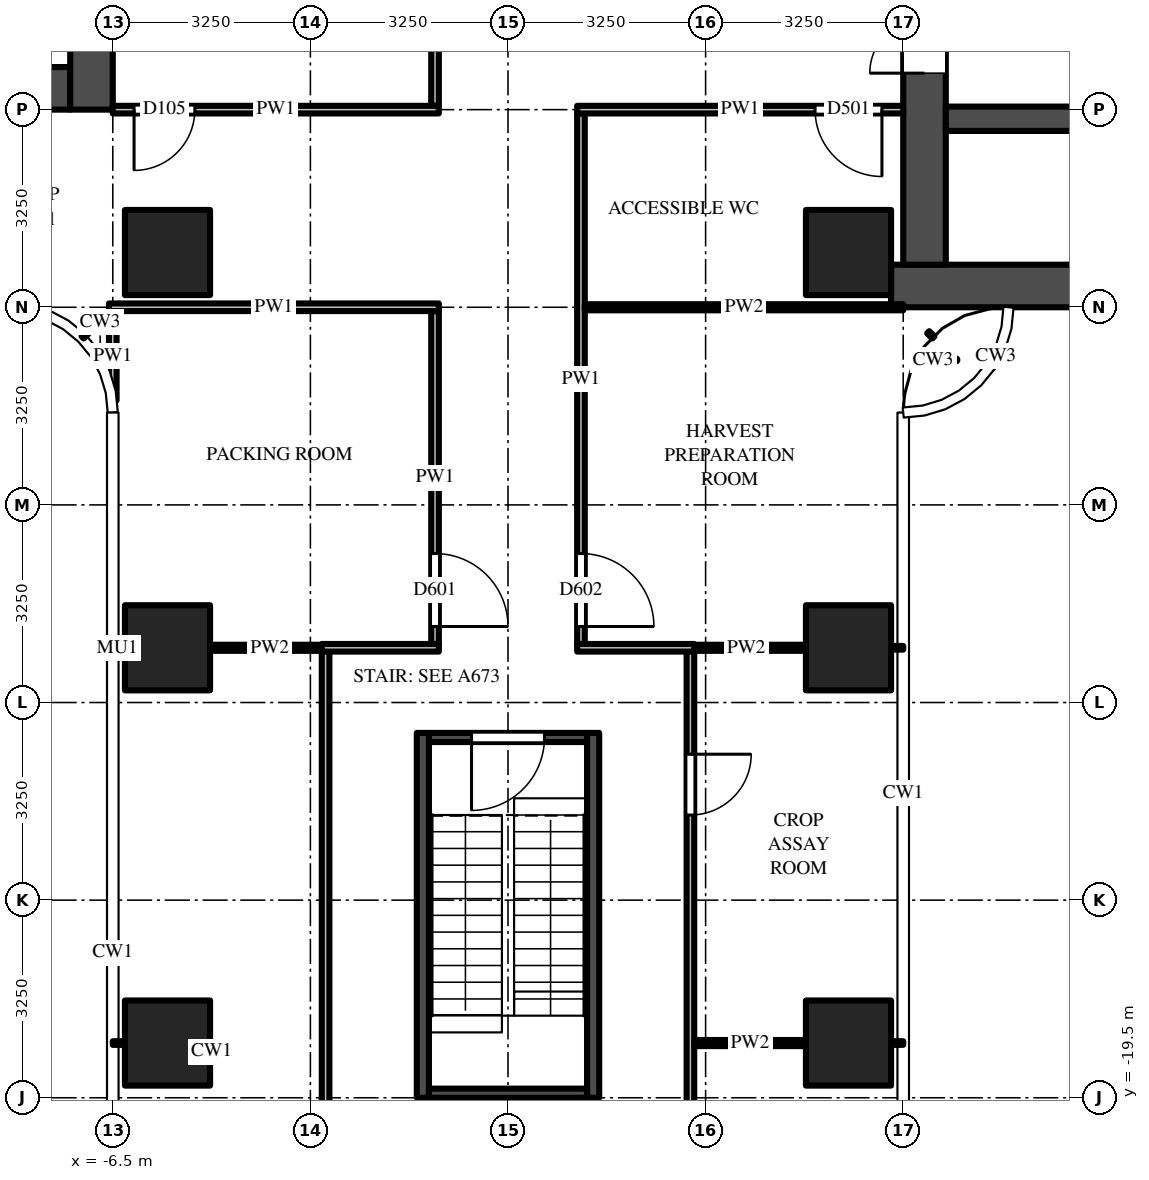
"""IFC4 building model, lengths in metres.
Left out: names, types, materials, properties, quantities, classifications, styles, units other than length and angle.
Written with IfcOpenShell. Run it as: python <this file> out.ifc"""

import sys

from ifc_helpers import new_model, si_unit, direction, frame, frame_2d, origin, origin_2d, place, context, subcontext, project, spatial, rectangle, extrude, source, transform, mapped, element, fill, save


model = new_model("IFC4")
c1 = context("Model", 3, precision=1e-05, world=origin(), true_north=direction((0.0, 1.0)))
c2 = subcontext(c1, "Body", "Model", "MODEL_VIEW")
j1 = project(units=[si_unit("LENGTHUNIT", "METRE"), si_unit("PLANEANGLEUNIT", "RADIAN")], contexts=[c1])
p1 = place(None, origin())
s1 = spatial("IfcSite", under=j1, at=p1, CompositionType="ELEMENT")
p2 = place(p1, origin())
s2 = spatial("IfcBuilding", under=s1, at=p2, CompositionType="ELEMENT")
p3 = place(p2, frame((0.0, 0.0, 70.0)))
s3 = spatial("IfcBuildingStorey", under=s2, at=p3, CompositionType="ELEMENT", Elevation=70.0)
m1 = source(origin(), c2, "Body", "SweptSolid", [
    extrude(rectangle(XDim=1.4, YDim=1.4, at=origin_2d()), origin(), (0.0, 0.0, 1.0), 4.5),
])
for number, where, z_axis, x_axis in (
    (1, (5.6, -5.6, 0.0), (0.0, 0.0, 1.0), (1.0, 0.0, 0.0)),
    (2, (-5.6, -5.6, 0.0), (0.0, 0.0, 1.0), (1.0, 0.0, 0.0)),
    (3, (5.6, -12.1, 0.0), (0.0, 0.0, 1.0), (1.0, 0.0, 0.0)),
    (4, (5.6, -18.6, 0.0), (0.0, 0.0, 1.0), (1.0, 0.0, 0.0)),
    (5, (-5.6, -12.1, 0.0), (0.0, 0.0, 1.0), (1.0, 0.0, 0.0)),
    (6, (-5.6, -18.6, 0.0), (0.0, 0.0, 1.0), (1.0, 0.0, 0.0)),
):
    element("IfcColumn", number, at=place(p3, frame(where, z_axis=z_axis, x_axis=x_axis)), inside=s3, PredefinedType="COLUMN", context=c2, shape_type="MappedRepresentation", body=[
        mapped(m1, transform((0.0, 0.0, 0.0))),
    ])
m2 = source(origin(), c2, "Body", "SweptSolid", [
    extrude(rectangle(XDim=16.45, YDim=0.7, at=frame_2d((8.225, 0.0))), origin(), (0.0, 0.0, 1.0), 4.25),
])
p4 = place(p3, frame((6.3, -6.15, 0.0), z_axis=(0.0, 0.0, 1.0), x_axis=(1.0, 0.0, 0.0)))
e7 = element("IfcWall", 7, at=p4, inside=s3, PredefinedType="SHEAR", context=c2, shape_type="MappedRepresentation", body=[
    mapped(m2, transform((0.0, 0.0, 0.0))),
])
m3 = source(origin(), c2, "Body", "SweptSolid", [
    extrude(rectangle(XDim=9.05, YDim=0.7, at=frame_2d((4.525, 0.0))), origin(), (0.0, 0.0, 1.0), 4.25),
])
p5 = place(p3, frame((6.85, -5.8, 0.0), z_axis=(0.0, 0.0, 1.0), x_axis=(0.0, 1.0, 0.0)))
e8 = element("IfcWall", 8, at=p5, inside=s3, PredefinedType="SHEAR", context=c2, shape_type="MappedRepresentation", body=[
    mapped(m3, transform((0.0, 0.0, 0.0))),
])
m4 = source(origin(), c2, "Body", "SweptSolid", [
    extrude(rectangle(XDim=1.8, YDim=2.1, at=frame_2d((0.9, 1.05))), frame((0.0, 0.36, 0.0), z_axis=(0.0, -1.0, 0.0), x_axis=(1.0, 0.0, 0.0)), (0.0, 0.0, 1.0), 0.72),
])
p6 = place(p5, frame((3.15, 0.0, 0.0)))
e9 = element("IfcOpeningElement", 9, at=p6, cuts=e8, PredefinedType="OPENING", context=c2, shape_type="MappedRepresentation", body=[
    mapped(m4, transform((0.0, 0.0, 0.0))),
])
m5 = source(origin(), c2, "Body", "SweptSolid", [
    extrude(rectangle(XDim=7.5, YDim=0.4, at=frame_2d((3.75, 0.0))), origin(), (0.0, 0.0, 1.0), 4.25),
])
p7 = place(p3, frame((7.2, -3.4, 0.0), z_axis=(0.0, 0.0, 1.0), x_axis=(1.0, 0.0, 0.0)))
e10 = element("IfcWall", 10, at=p7, inside=s3, PredefinedType="SHEAR", context=c2, shape_type="MappedRepresentation", body=[
    mapped(m5, transform((0.0, 0.0, 0.0))),
])
m6 = source(origin(), c2, "Body", "SweptSolid", [
    extrude(rectangle(XDim=1.1, YDim=2.1, at=frame_2d((0.55, 1.05))), frame((0.0, 0.21, 0.0), z_axis=(0.0, -1.0, 0.0), x_axis=(1.0, 0.0, 0.0)), (0.0, 0.0, 1.0), 0.42),
])
p8 = place(p7, frame((3.0, 0.0, 0.0)))
e11 = element("IfcOpeningElement", 11, at=p8, cuts=e10, PredefinedType="OPENING", context=c2, shape_type="MappedRepresentation", body=[
    mapped(m6, transform((0.0, 0.0, 0.0))),
])
p9 = place(p7, frame((5.5, 0.0, 0.0)))
e12 = element("IfcOpeningElement", 12, at=p9, cuts=e10, PredefinedType="OPENING", context=c2, shape_type="MappedRepresentation", body=[
    mapped(m6, transform((0.0, 0.0, 0.0))),
])
m7 = source(origin(), c2, "Body", "SweptSolid", [
    extrude(rectangle(XDim=14.85, YDim=0.7, at=frame_2d((7.425, 0.0))), origin(), (0.0, 0.0, 1.0), 4.25),
])
p10 = place(p3, frame((-7.2, -2.9, 0.0), z_axis=(0.0, 0.0, 1.0), x_axis=(-1.0, 0.0, 0.0)))
e13 = element("IfcWall", 13, at=p10, inside=s3, PredefinedType="SHEAR", context=c2, shape_type="MappedRepresentation", body=[
    mapped(m7, transform((0.0, 0.0, 0.0))),
])
m8 = source(origin(), c2, "Body", "SweptSolid", [
    extrude(rectangle(XDim=1.3, YDim=2.1, at=frame_2d((0.65, 1.05))), frame((0.0, 0.36, 0.0), z_axis=(0.0, -1.0, 0.0), x_axis=(1.0, 0.0, 0.0)), (0.0, 0.0, 1.0), 0.72),
])
p11 = place(p10, frame((12.2, 0.0, 0.0)))
e14 = element("IfcOpeningElement", 14, at=p11, cuts=e13, PredefinedType="OPENING", context=c2, shape_type="MappedRepresentation", body=[
    mapped(m8, transform((0.0, 0.0, 0.0))),
])
m9 = source(origin(), c2, "Body", "SweptSolid", [
    extrude(rectangle(XDim=1.2, YDim=2.1, at=frame_2d((0.6, 1.05))), frame((0.0, 0.36, 0.0), z_axis=(0.0, -1.0, 0.0), x_axis=(1.0, 0.0, 0.0)), (0.0, 0.0, 1.0), 0.72),
])
p12 = place(p10, frame((9.85, 0.0, 0.0)))
e15 = element("IfcOpeningElement", 15, at=p12, cuts=e13, PredefinedType="OPENING", context=c2, shape_type="MappedRepresentation", body=[
    mapped(m9, transform((0.0, 0.0, 0.0))),
])
m10 = source(origin(), c2, "Body", "SweptSolid", [
    extrude(rectangle(XDim=1.0, YDim=2.1, at=frame_2d((0.5, 1.05))), frame((0.0, 0.36, 0.0), z_axis=(0.0, -1.0, 0.0), x_axis=(1.0, 0.0, 0.0)), (0.0, 0.0, 1.0), 0.72),
])
p13 = place(p10, frame((7.9, 0.0, 0.0)))
e16 = element("IfcOpeningElement", 16, at=p13, cuts=e13, PredefinedType="OPENING", context=c2, shape_type="MappedRepresentation", body=[
    mapped(m10, transform((0.0, 0.0, 0.0))),
])
m11 = source(origin(), c2, "Body", "SweptSolid", [
    extrude(rectangle(XDim=0.9, YDim=2.1, at=frame_2d((0.45, 1.05))), frame((0.0, 0.36, 0.0), z_axis=(0.0, -1.0, 0.0), x_axis=(1.0, 0.0, 0.0)), (0.0, 0.0, 1.0), 0.72),
])
p14 = place(p10, frame((0.65, 0.0, 0.0)))
e17 = element("IfcOpeningElement", 17, at=p14, cuts=e13, PredefinedType="OPENING", context=c2, shape_type="MappedRepresentation", body=[
    mapped(m11, transform((0.0, 0.0, 0.0))),
])
p15 = place(p10, frame((3.2, 0.0, 0.0)))
e18 = element("IfcOpeningElement", 18, at=p15, cuts=e13, PredefinedType="OPENING", context=c2, shape_type="MappedRepresentation", body=[
    mapped(m10, transform((0.0, 0.0, 0.0))),
])
p16 = place(p10, frame((5.85, 0.0, 0.0)))
e19 = element("IfcOpeningElement", 19, at=p16, cuts=e13, PredefinedType="OPENING", context=c2, shape_type="MappedRepresentation", body=[
    mapped(m11, transform((0.0, 0.0, 0.0))),
])
p17 = place(p3, frame((-6.85, 5.8, 0.0), z_axis=(0.0, 0.0, 1.0), x_axis=(0.0, -1.0, 0.0)))
e20 = element("IfcWall", 20, at=p17, inside=s3, PredefinedType="SHEAR", context=c2, shape_type="MappedRepresentation", body=[
    mapped(m3, transform((0.0, 0.0, 0.0))),
])
p18 = place(p17, frame((3.15, 0.0, 0.0)))
e21 = element("IfcOpeningElement", 21, at=p18, cuts=e20, PredefinedType="OPENING", context=c2, shape_type="MappedRepresentation", body=[
    mapped(m4, transform((0.0, 0.0, 0.0))),
])
m12 = source(origin(), c2, "Body", "SweptSolid", [
    extrude(rectangle(XDim=6.0, YDim=0.2, at=frame_2d((3.0, 0.0))), origin(), (0.0, 0.0, 1.0), 4.25),
])
for number, where, z_axis, x_axis in (
    (22, (1.4, -13.5, 0.0), (0.0, 0.0, 1.0), (0.0, -1.0, 0.0)),
    (23, (-1.4, -13.5, 0.0), (0.0, 0.0, 1.0), (0.0, -1.0, 0.0)),
):
    element("IfcWall", number, at=place(p3, frame(where, z_axis=z_axis, x_axis=x_axis)), inside=s3, PredefinedType="SHEAR", context=c2, shape_type="MappedRepresentation", body=[
        mapped(m12, transform((0.0, 0.0, 0.0))),
    ])
m13 = source(origin(), c2, "Body", "SweptSolid", [
    extrude(rectangle(XDim=2.6, YDim=0.15, at=frame_2d((1.3, 0.0))), origin(), (0.0, 0.0, 1.0), 4.25),
])
p19 = place(p3, frame((1.3, -13.575, 0.0), z_axis=(0.0, 0.0, 1.0), x_axis=(-1.0, 0.0, 0.0)))
e24 = element("IfcWall", 24, at=p19, inside=s3, PredefinedType="SHEAR", context=c2, shape_type="MappedRepresentation", body=[
    mapped(m13, transform((0.0, 0.0, 0.0))),
])
m14 = source(origin(), c2, "Body", "SweptSolid", [
    extrude(rectangle(XDim=1.2, YDim=2.1, at=frame_2d((0.6, 1.05))), frame((0.0, 0.085, 0.0), z_axis=(0.0, -1.0, 0.0), x_axis=(1.0, 0.0, 0.0)), (0.0, 0.0, 1.0), 0.17),
])
p20 = place(p19, frame((0.7, 0.0, 0.0)))
e25 = element("IfcOpeningElement", 25, at=p20, cuts=e24, PredefinedType="OPENING", context=c2, shape_type="MappedRepresentation", body=[
    mapped(m14, transform((0.0, 0.0, 0.0))),
])
p21 = place(p3, frame((1.3, -19.425, 0.0), z_axis=(0.0, 0.0, 1.0), x_axis=(-1.0, 0.0, 0.0)))
e26 = element("IfcWall", 26, at=p21, inside=s3, PredefinedType="SHEAR", context=c2, shape_type="MappedRepresentation", body=[
    mapped(m13, transform((0.0, 0.0, 0.0))),
])
m15 = source(origin(), c2, "Body", "SweptSolid", [
    extrude(rectangle(XDim=1.469, YDim=0.125, at=frame_2d((0.734, 0.0))), origin(), (0.0, 0.0, 1.0), 4.25),
])
p22 = place(p3, frame((-6.5, -6.562, 0.0), z_axis=(0.0, 0.0, 1.0), x_axis=(0.0, -1.0, 0.0)))
e27 = element("IfcWall", 27, at=p22, inside=s3, PredefinedType="PARTITIONING", context=c2, shape_type="MappedRepresentation", body=[
    mapped(m15, transform((0.0, 0.0, 0.0))),
])
m16 = source(origin(), c2, "Body", "SweptSolid", [
    extrude(rectangle(XDim=8.788, YDim=0.125, at=frame_2d((4.394, 0.0))), origin(), (0.0, 0.0, 1.0), 3.468),
])
p23 = place(p3, frame((-3.0, -20.938, 0.0), z_axis=(0.0, 0.0, 1.0), x_axis=(0.0, 1.0, 0.0)))
e28 = element("IfcWall", 28, at=p23, inside=s3, PredefinedType="PARTITIONING", context=c2, shape_type="MappedRepresentation", body=[
    mapped(m16, transform((0.0, 0.0, 0.0))),
])
m17 = source(origin(), c2, "Body", "SweptSolid", [
    extrude(rectangle(XDim=5.475, YDim=0.125, at=frame_2d((2.738, 0.0))), origin(), (0.0, 0.0, 1.0), 3.468),
])
p24 = place(p3, frame((-1.2, -6.562, 0.0), z_axis=(0.0, 0.0, 1.0), x_axis=(0.0, -1.0, 0.0)))
e29 = element("IfcWall", 29, at=p24, inside=s3, PredefinedType="PARTITIONING", context=c2, shape_type="MappedRepresentation", body=[
    mapped(m17, transform((0.0, 0.0, 0.0))),
])
m18 = source(origin(), c2, "Body", "SweptSolid", [
    extrude(rectangle(XDim=1.2, YDim=2.1, at=frame_2d((0.6, 1.05))), frame((0.0, 0.073, 0.0), z_axis=(0.0, -1.0, 0.0), x_axis=(1.0, 0.0, 0.0)), (0.0, 0.0, 1.0), 0.145),
])
p25 = place(p24, frame((3.988, 0.0, 0.0)))
e30 = element("IfcOpeningElement", 30, at=p25, cuts=e29, PredefinedType="OPENING", context=c2, shape_type="MappedRepresentation", body=[
    mapped(m18, transform((0.0, 0.0, 0.0))),
])
m19 = source(origin(), c2, "Body", "SweptSolid", [
    extrude(rectangle(XDim=3.125, YDim=0.125, at=frame_2d((1.562, 0.0))), origin(), (0.0, 0.0, 1.0), 3.546),
])
p26 = place(p3, frame((-1.2, -0.062, 0.0), z_axis=(0.0, 0.0, 1.0), x_axis=(0.0, -1.0, 0.0)))
e31 = element("IfcWall", 31, at=p26, inside=s3, PredefinedType="PARTITIONING", context=c2, shape_type="MappedRepresentation", body=[
    mapped(m19, transform((0.0, 0.0, 0.0))),
])
m20 = source(origin(), c2, "Body", "SweptSolid", [
    extrude(rectangle(XDim=8.725, YDim=0.125, at=frame_2d((4.363, 0.0))), origin(), (0.0, 0.0, 1.0), 3.468),
])
p27 = place(p3, frame((1.2, -3.312, 0.0), z_axis=(0.0, 0.0, 1.0), x_axis=(0.0, -1.0, 0.0)))
e32 = element("IfcWall", 32, at=p27, inside=s3, PredefinedType="PARTITIONING", context=c2, shape_type="MappedRepresentation", body=[
    mapped(m20, transform((0.0, 0.0, 0.0))),
])
p28 = place(p27, frame((7.238, 0.0, 0.0)))
e33 = element("IfcOpeningElement", 33, at=p28, cuts=e32, PredefinedType="OPENING", context=c2, shape_type="MappedRepresentation", body=[
    mapped(m18, transform((0.0, 0.0, 0.0))),
])
p29 = place(p3, frame((3.0, -12.15, 0.0), z_axis=(0.0, 0.0, 1.0), x_axis=(0.0, -1.0, 0.0)))
e34 = element("IfcWall", 34, at=p29, inside=s3, PredefinedType="PARTITIONING", context=c2, shape_type="MappedRepresentation", body=[
    mapped(m16, transform((0.0, 0.0, 0.0))),
])
m21 = source(origin(), c2, "Body", "SweptSolid", [
    extrude(rectangle(XDim=1.0, YDim=2.1, at=frame_2d((0.5, 1.05))), frame((0.0, 0.073, 0.0), z_axis=(0.0, -1.0, 0.0), x_axis=(1.0, 0.0, 0.0)), (0.0, 0.0, 1.0), 0.145),
])
p30 = place(p29, frame((1.7, 0.0, 0.0)))
e35 = element("IfcOpeningElement", 35, at=p30, cuts=e34, PredefinedType="OPENING", context=c2, shape_type="MappedRepresentation", body=[
    mapped(m21, transform((0.0, 0.0, 0.0))),
])
m22 = source(origin(), c2, "Body", "SweptSolid", [
    extrude(rectangle(XDim=1.837, YDim=0.1, at=frame_2d((0.919, 0.0))), origin(), (0.0, 0.0, 1.0), 3.697),
])
p31 = place(p3, frame((3.062, -18.6, 0.0), z_axis=(0.0, 0.0, 1.0), x_axis=(1.0, 0.0, 0.0)))
e36 = element("IfcWall", 36, at=p31, inside=s3, PredefinedType="PARTITIONING", context=c2, shape_type="MappedRepresentation", body=[
    mapped(m22, transform((0.0, 0.0, 0.0))),
])
m23 = source(origin(), c2, "Body", "SweptSolid", [
    extrude(rectangle(XDim=1.962, YDim=0.1, at=frame_2d((0.981, 0.0))), origin(), (0.0, 0.0, 1.0), 3.468),
])
for number, where, z_axis, x_axis in (
    (37, (-4.9, -12.1, 0.0), (0.0, 0.0, 1.0), (1.0, 0.0, 0.0)),
    (38, (2.938, -12.1, 0.0), (0.0, 0.0, 1.0), (1.0, 0.0, 0.0)),
):
    element("IfcWall", number, at=place(p3, frame(where, z_axis=z_axis, x_axis=x_axis)), inside=s3, PredefinedType="PARTITIONING", context=c2, shape_type="MappedRepresentation", body=[
        mapped(m23, transform((0.0, 0.0, 0.0))),
    ])
m24 = source(origin(), c2, "Body", "SweptSolid", [
    extrude(rectangle(XDim=1.925, YDim=0.125, at=frame_2d((0.962, 0.0))), origin(), (0.0, 0.0, 1.0), 3.468),
])
for number, where, z_axis, x_axis in (
    (39, (-3.062, -12.1, 0.0), (0.0, 0.0, 1.0), (1.0, 0.0, 0.0)),
    (40, (1.137, -12.1, 0.0), (0.0, 0.0, 1.0), (1.0, 0.0, 0.0)),
):
    element("IfcWall", number, at=place(p3, frame(where, z_axis=z_axis, x_axis=x_axis)), inside=s3, PredefinedType="PARTITIONING", context=c2, shape_type="MappedRepresentation", body=[
        mapped(m24, transform((0.0, 0.0, 0.0))),
    ])
m25 = source(origin(), c2, "Body", "SweptSolid", [
    extrude(rectangle(XDim=5.238, YDim=0.1, at=frame_2d((2.619, 0.0))), origin(), (0.0, 0.0, 1.0), 3.33),
])
p32 = place(p3, frame((1.262, -6.5, 0.0), z_axis=(0.0, 0.0, 1.0), x_axis=(1.0, 0.0, 0.0)))
e41 = element("IfcWall", 41, at=p32, inside=s3, PredefinedType="PARTITIONING", context=c2, shape_type="MappedRepresentation", body=[
    mapped(m25, transform((0.0, 0.0, 0.0))),
])
m26 = source(origin(), c2, "Body", "SweptSolid", [
    extrude(rectangle(XDim=5.425, YDim=0.125, at=frame_2d((2.712, 0.0))), origin(), (0.0, 0.0, 1.0), 3.33),
])
p33 = place(p3, frame((-1.137, -6.5, 0.0), z_axis=(0.0, 0.0, 1.0), x_axis=(-1.0, 0.0, 0.0)))
e42 = element("IfcWall", 42, at=p33, inside=s3, PredefinedType="PARTITIONING", context=c2, shape_type="MappedRepresentation", body=[
    mapped(m26, transform((0.0, 0.0, 0.0))),
])
m27 = source(origin(), c2, "Body", "SweptSolid", [
    extrude(rectangle(XDim=5.363, YDim=0.125, at=frame_2d((2.681, 0.0))), origin(), (0.0, 0.0, 1.0), 3.468),
])
p34 = place(p3, frame((-1.137, -3.25, 0.0), z_axis=(0.0, 0.0, 1.0), x_axis=(-1.0, 0.0, 0.0)))
e43 = element("IfcWall", 43, at=p34, inside=s3, PredefinedType="PARTITIONING", context=c2, shape_type="MappedRepresentation", body=[
    mapped(m27, transform((0.0, 0.0, 0.0))),
])
p35 = place(p34, frame((4.012, 0.0, 0.0)))
e44 = element("IfcOpeningElement", 44, at=p35, cuts=e43, PredefinedType="OPENING", context=c2, shape_type="MappedRepresentation", body=[
    mapped(m21, transform((0.0, 0.0, 0.0))),
])
p36 = place(p3, frame((6.5, -3.25, 0.0), z_axis=(0.0, 0.0, 1.0), x_axis=(-1.0, 0.0, 0.0)))
e45 = element("IfcWall", 45, at=p36, inside=s3, PredefinedType="PARTITIONING", context=c2, shape_type="MappedRepresentation", body=[
    mapped(m27, transform((0.0, 0.0, 0.0))),
])
m28 = source(origin(), c2, "Body", "SweptSolid", [
    extrude(rectangle(XDim=1.1, YDim=2.1, at=frame_2d((0.55, 1.05))), frame((0.0, 0.073, 0.0), z_axis=(0.0, -1.0, 0.0), x_axis=(1.0, 0.0, 0.0)), (0.0, 0.0, 1.0), 0.145),
])
p37 = place(p36, frame((0.35, 0.0, 0.0)))
e46 = element("IfcOpeningElement", 46, at=p37, cuts=e45, PredefinedType="OPENING", context=c2, shape_type="MappedRepresentation", body=[
    mapped(m28, transform((0.0, 0.0, 0.0))),
])
m29 = source(origin(), c2, "Body", "SweptSolid", [
    extrude(rectangle(XDim=1.8, YDim=2.1, at=frame_2d((0.9, 1.05))), frame((0.0, -0.275, 0.0), z_axis=(0.0, -1.0, 0.0), x_axis=(1.0, 0.0, 0.0)), (0.0, 0.0, 1.0), 0.05),
])
p38 = place(p6, origin())
e47 = element("IfcDoor", 47, at=p38, inside=s3, OperationType="DOUBLE_DOOR_SINGLE_SWING", PredefinedType="DOOR", context=c2, shape_type="MappedRepresentation", body=[
    mapped(m29, transform((0.0, 0.0, 0.0))),
])
fill(e9, e47)
m30 = source(origin(), c2, "Body", "SweptSolid", [
    extrude(rectangle(XDim=1.2, YDim=2.1, at=frame_2d((0.6, 1.05))), frame((0.0, 0.025, 0.0), z_axis=(0.0, -1.0, 0.0), x_axis=(1.0, 0.0, 0.0)), (0.0, 0.0, 1.0), 0.05),
])
p39 = place(p20, origin())
e48 = element("IfcDoor", 48, at=p39, inside=s3, OperationType="SINGLE_SWING_RIGHT", PredefinedType="DOOR", context=c2, shape_type="MappedRepresentation", body=[
    mapped(m30, transform((0.0, 0.0, 0.0))),
])
fill(e25, e48)
m31 = source(origin(), c2, "Body", "SweptSolid", [
    extrude(rectangle(XDim=1.0, YDim=2.1, at=frame_2d((0.5, 1.05))), frame((0.0, 0.025, 0.0), z_axis=(0.0, -1.0, 0.0), x_axis=(1.0, 0.0, 0.0)), (0.0, 0.0, 1.0), 0.05),
])
p40 = place(p30, origin())
e49 = element("IfcDoor", 49, at=p40, inside=s3, OperationType="SINGLE_SWING_LEFT", PredefinedType="DOOR", context=c2, shape_type="MappedRepresentation", body=[
    mapped(m31, transform((0.0, 0.0, 0.0))),
])
fill(e35, e49)
p41 = place(p25, origin())
e50 = element("IfcDoor", 50, at=p41, inside=s3, OperationType="SINGLE_SWING_RIGHT", PredefinedType="DOOR", context=c2, shape_type="MappedRepresentation", body=[
    mapped(m30, transform((0.0, 0.0, 0.0))),
])
fill(e30, e50)
p42 = place(p28, origin())
e51 = element("IfcDoor", 51, at=p42, inside=s3, OperationType="SINGLE_SWING_RIGHT", PredefinedType="DOOR", context=c2, shape_type="MappedRepresentation", body=[
    mapped(m30, transform((0.0, 0.0, 0.0))),
])
fill(e33, e51)
p43 = place(p35, origin())
e52 = element("IfcDoor", 52, at=p43, inside=s3, OperationType="SINGLE_SWING_RIGHT", PredefinedType="DOOR", context=c2, shape_type="MappedRepresentation", body=[
    mapped(m31, transform((0.0, 0.0, 0.0))),
])
fill(e44, e52)
m32 = source(origin(), c2, "Body", "SweptSolid", [
    extrude(rectangle(XDim=1.1, YDim=2.1, at=frame_2d((0.55, 1.05))), frame((0.0, 0.025, 0.0), z_axis=(0.0, -1.0, 0.0), x_axis=(1.0, 0.0, 0.0)), (0.0, 0.0, 1.0), 0.05),
])
p44 = place(p37, origin())
e53 = element("IfcDoor", 53, at=p44, inside=s3, OperationType="SINGLE_SWING_LEFT", PredefinedType="DOOR", context=c2, shape_type="MappedRepresentation", body=[
    mapped(m32, transform((0.0, 0.0, 0.0))),
])
fill(e46, e53)
save(model, sys.argv[1])
